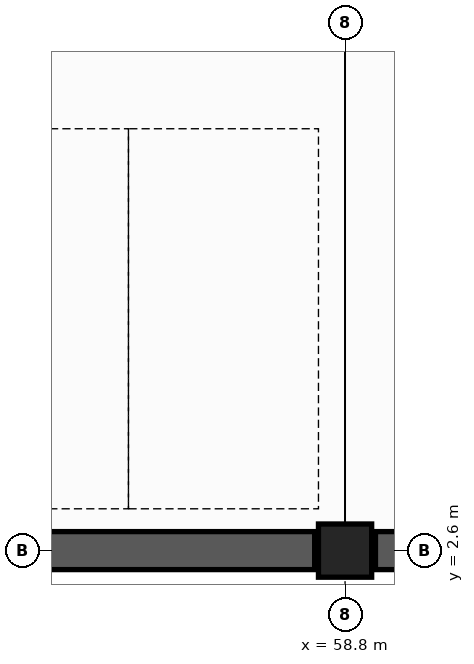
"""IFC4 building model, lengths in metres.
Left out: names, types, materials, properties, quantities, classifications, styles, units other than length and angle.
Written with IfcOpenShell. Run it as: python <this file> out.ifc"""

import sys

from ifc_helpers import new_model, si_unit, direction, frame, frame_2d, origin, origin_2d, place, context, subcontext, project, spatial, rectangle, extrude, element, save


model = new_model("IFC4")
c1 = context("Model", 3, precision=1e-05, world=origin(), true_north=direction((0.0, 1.0)))
c2 = subcontext(c1, "Body", "Model", "MODEL_VIEW")
j1 = project(units=[si_unit("LENGTHUNIT", "METRE"), si_unit("PLANEANGLEUNIT", "RADIAN")], contexts=[c1])
p1 = place(None, origin())
s1 = spatial("IfcSite", under=j1, at=p1, CompositionType="ELEMENT")
p2 = place(p1, origin())
s2 = spatial("IfcBuilding", under=s1, at=p2, CompositionType="ELEMENT")
p3 = place(p2, frame((0.0, 0.0, -5.4)))
s3 = spatial("IfcBuildingStorey", under=s2, at=p3, CompositionType="ELEMENT", Elevation=-5.4)
p4 = place(p3, frame((58.8, 2.6, -0.4), z_axis=(0.0, 0.0, 1.0), x_axis=(1.0, 0.0, 0.0)))
e1 = element("IfcColumn", 1, at=p4, inside=s3, PredefinedType="COLUMN", context=c2, shape_type="SweptSolid", body=[
    extrude(rectangle(XDim=0.7, YDim=0.7, at=origin_2d()), origin(), (0.0, 0.0, 1.0), 5.8),
])
p5 = place(p3, frame((66.8, 2.6, 0.0), z_axis=(0.0, 0.0, 1.0), x_axis=(-1.0, 0.0, 0.0)))
e2 = element("IfcWall", 2, at=p5, inside=s3, PredefinedType="USERDEFINED", context=c2, shape_type="SweptSolid", body=[
    extrude(rectangle(XDim=7.6, YDim=0.5, at=frame_2d((3.8, 0.0))), origin(), (0.0, 0.0, 1.0), 5.08),
])
p6 = place(p3, frame((58.4, 2.6, 0.0), z_axis=(0.0, 0.0, 1.0), x_axis=(-1.0, 0.0, 0.0)))
e3 = element("IfcWall", 3, at=p6, inside=s3, PredefinedType="USERDEFINED", context=c2, shape_type="SweptSolid", body=[
    extrude(rectangle(XDim=7.6, YDim=0.5, at=frame_2d((3.8, 0.0))), origin(), (0.0, 0.0, 1.0), 5.08),
])
save(model, sys.argv[1])
